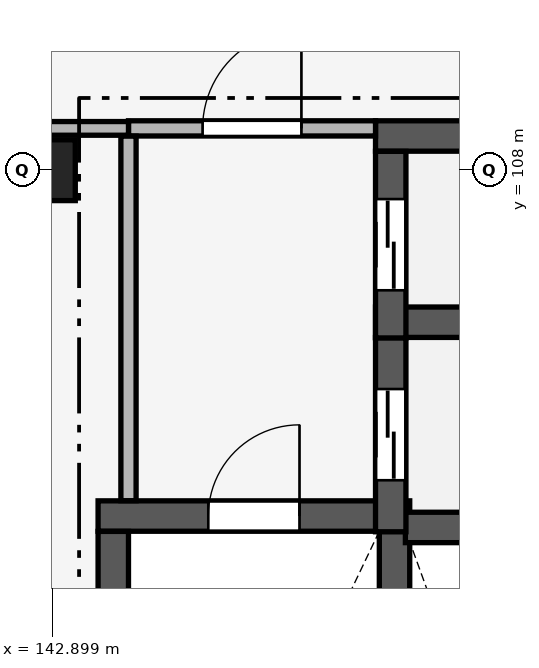
"""IFC4 building model, lengths in metres.
Left out: names, types, materials, properties, quantities, classifications, styles, units other than length and angle.
Written with IfcOpenShell. Run it as: python <this file> out.ifc"""

import sys

from ifc_helpers import new_model, si_unit, direction, frame, frame_2d, origin, origin_2d, place, context, subcontext, project, spatial, rectangle, extrude, element, fill, save


model = new_model("IFC4")
c1 = context("Model", 3, precision=1e-05, world=origin(), true_north=direction((0.0, 1.0)))
c2 = subcontext(c1, "Body", "Model", "MODEL_VIEW")
j1 = project(units=[si_unit("LENGTHUNIT", "METRE"), si_unit("PLANEANGLEUNIT", "RADIAN")], contexts=[c1])
p1 = place(None, origin())
s1 = spatial("IfcSite", under=j1, at=p1, CompositionType="ELEMENT")
p2 = place(p1, origin())
s2 = spatial("IfcBuilding", under=s1, at=p2, CompositionType="ELEMENT")
p3 = place(p2, frame((0.0, 0.0, 15.3)))
s3 = spatial("IfcBuildingStorey", under=s2, at=p3, CompositionType="ELEMENT", Elevation=15.3)
p4 = place(p3, frame((142.8, 108.0, 0.0), z_axis=(0.0, 0.0, 1.0), x_axis=(1.0, 0.0, 0.0)))
e1 = element("IfcColumn", 1, at=p4, inside=s3, PredefinedType="COLUMN", context=c2, shape_type="SweptSolid", body=[
    extrude(rectangle(XDim=0.8, YDim=0.8, at=origin_2d()), origin(), (0.0, 0.0, 1.0), 5.1),
])
p5 = place(p3, frame((143.5, 103.45, 0.0), z_axis=(0.0, 0.0, 1.0), x_axis=(1.0, 0.0, 0.0)))
e2 = element("IfcWall", 2, at=p5, inside=s3, PredefinedType="SHEAR", context=c2, shape_type="SweptSolid", body=[
    extrude(rectangle(XDim=4.1, YDim=0.4, at=frame_2d((2.05, 0.0))), origin(), (0.0, 0.0, 1.0), 4.84),
])
p6 = place(p5, frame((1.45, 0.0, 0.0)))
e3 = element("IfcOpeningElement", 3, at=p6, cuts=e2, PredefinedType="OPENING", context=c2, shape_type="SweptSolid", body=[
    extrude(rectangle(XDim=1.2, YDim=2.2, at=frame_2d((0.6, 1.1))), frame((0.0, 0.215, 0.0), z_axis=(0.0, -1.0, 0.0), x_axis=(1.0, 0.0, 0.0)), (0.0, 0.0, 1.0), 0.43),
])
for number, where, z_axis, x_axis in (
    (4, (143.7, 96.352, 0.0), (0.0, 0.0, 1.0), (0.0, 1.0, 0.0)),
    (5, (147.4, 96.352, 0.0), (0.0, 0.0, 1.0), (0.0, 1.0, 0.0)),
):
    element("IfcWall", number, at=place(p3, frame(where, z_axis=z_axis, x_axis=x_axis)), inside=s3, PredefinedType="SHEAR", context=c2, shape_type="SweptSolid", body=[
        extrude(rectangle(XDim=6.896, YDim=0.4, at=frame_2d((3.448, 0.0))), origin(), (0.0, 0.0, 1.0), 4.84),
    ])
p7 = place(p3, frame((147.543, 103.3, 0.0), z_axis=(0.0, 0.0, 1.0), x_axis=(1.0, 0.0, 0.0)))
e6 = element("IfcWall", 6, at=p7, inside=s3, PredefinedType="SHEAR", context=c2, shape_type="SweptSolid", body=[
    extrude(rectangle(XDim=2.907, YDim=0.4, at=frame_2d((1.454, 0.0))), origin(), (0.0, 0.0, 1.0), 4.84),
])
p8 = place(p3, frame((147.15, 106.0, 0.0), z_axis=(0.0, 0.0, 1.0), x_axis=(1.0, 0.0, 0.0)))
e7 = element("IfcWall", 7, at=p8, inside=s3, PredefinedType="SHEAR", context=c2, shape_type="SweptSolid", body=[
    extrude(rectangle(XDim=3.3, YDim=0.4, at=frame_2d((1.65, 0.0))), origin(), (0.0, 0.0, 1.0), 4.84),
])
p9 = place(p3, frame((147.35, 103.243, 0.0), z_axis=(0.0, 0.0, 1.0), x_axis=(0.0, 1.0, 0.0)))
e8 = element("IfcWall", 8, at=p9, inside=s3, PredefinedType="SHEAR", context=c2, shape_type="SweptSolid", body=[
    extrude(rectangle(XDim=2.555, YDim=0.4, at=frame_2d((1.278, 0.0))), origin(), (0.0, 0.0, 1.0), 4.84),
])
p10 = place(p9, frame((0.678, 0.0, 0.0)))
e9 = element("IfcOpeningElement", 9, at=p10, cuts=e8, PredefinedType="OPENING", context=c2, shape_type="SweptSolid", body=[
    extrude(rectangle(XDim=1.2, YDim=2.15, at=frame_2d((0.6, 1.075))), frame((0.0, 0.215, 0.0), z_axis=(0.0, -1.0, 0.0), x_axis=(1.0, 0.0, 0.0)), (0.0, 0.0, 1.0), 0.43),
])
p11 = place(p3, frame((147.15, 108.45, 0.0), z_axis=(0.0, 0.0, 1.0), x_axis=(1.0, 0.0, 0.0)))
e10 = element("IfcWall", 10, at=p11, inside=s3, PredefinedType="SHEAR", context=c2, shape_type="SweptSolid", body=[
    extrude(rectangle(XDim=3.659, YDim=0.4, at=frame_2d((1.83, 0.0))), origin(), (0.0, 0.0, 1.0), 4.84),
])
p12 = place(p3, frame((147.35, 105.793, 0.0), z_axis=(0.0, 0.0, 1.0), x_axis=(0.0, 1.0, 0.0)))
e11 = element("IfcWall", 11, at=p12, inside=s3, PredefinedType="SHEAR", context=c2, shape_type="SweptSolid", body=[
    extrude(rectangle(XDim=2.455, YDim=0.4, at=frame_2d((1.228, 0.0))), origin(), (0.0, 0.0, 1.0), 4.84),
])
p13 = place(p12, frame((0.627, 0.0, 0.0)))
e12 = element("IfcOpeningElement", 12, at=p13, cuts=e11, PredefinedType="OPENING", context=c2, shape_type="SweptSolid", body=[
    extrude(rectangle(XDim=1.2, YDim=2.15, at=frame_2d((0.6, 1.075))), frame((0.0, 0.215, 0.0), z_axis=(0.0, -1.0, 0.0), x_axis=(1.0, 0.0, 0.0)), (0.0, 0.0, 1.0), 0.43),
])
p14 = place(p3, frame((143.9, 108.55, 0.0), z_axis=(0.0, 0.0, 1.0), x_axis=(1.0, 0.0, 0.0)))
e13 = element("IfcWall", 13, at=p14, inside=s3, PredefinedType="PARTITIONING", context=c2, shape_type="SweptSolid", body=[
    extrude(rectangle(XDim=3.25, YDim=0.2, at=frame_2d((1.625, 0.0))), origin(), (0.0, 0.0, 1.0), 4.84),
])
p15 = place(p14, frame((0.975, 0.0, 0.0)))
e14 = element("IfcOpeningElement", 14, at=p15, cuts=e13, PredefinedType="OPENING", context=c2, shape_type="SweptSolid", body=[
    extrude(rectangle(XDim=1.3, YDim=2.2, at=frame_2d((0.65, 1.1))), frame((0.0, 0.115, 0.0), z_axis=(0.0, -1.0, 0.0), x_axis=(1.0, 0.0, 0.0)), (0.0, 0.0, 1.0), 0.23),
])
p16 = place(p3, frame((142.405, 108.55, 0.0), z_axis=(0.0, 0.0, 1.0), x_axis=(1.0, 0.0, 0.0)))
e15 = element("IfcWall", 15, at=p16, inside=s3, PredefinedType="PARTITIONING", context=c2, shape_type="SweptSolid", body=[
    extrude(rectangle(XDim=1.495, YDim=0.18, at=frame_2d((0.748, 0.0))), origin(), (0.0, 0.0, 1.0), 4.29),
])
p17 = place(p3, frame((143.9, 103.652, 0.0), z_axis=(0.0, 0.0, 1.0), x_axis=(0.0, 1.0, 0.0)))
e16 = element("IfcWall", 16, at=p17, inside=s3, PredefinedType="PARTITIONING", context=c2, shape_type="SweptSolid", body=[
    extrude(rectangle(XDim=4.796, YDim=0.2, at=frame_2d((2.398, 0.0))), origin(), (0.0, 0.0, 1.0), 4.84),
])
p18 = place(p6, origin())
e17 = element("IfcDoor", 17, at=p18, inside=s3, OperationType="SINGLE_SWING_RIGHT", PredefinedType="DOOR", context=c2, shape_type="SweptSolid", body=[
    extrude(rectangle(XDim=1.2, YDim=2.2, at=frame_2d((0.6, 1.1))), frame((0.0, 0.025, 0.0), z_axis=(0.0, -1.0, 0.0), x_axis=(1.0, 0.0, 0.0)), (0.0, 0.0, 1.0), 0.05),
])
fill(e3, e17)
p19 = place(p10, origin())
e18 = element("IfcDoor", 18, at=p19, inside=s3, OperationType="DOUBLE_DOOR_SLIDING", PredefinedType="DOOR", context=c2, shape_type="SweptSolid", body=[
    extrude(rectangle(XDim=1.2, YDim=2.15, at=frame_2d((0.6, 1.075))), frame((0.0, 0.025, 0.0), z_axis=(0.0, -1.0, 0.0), x_axis=(1.0, 0.0, 0.0)), (0.0, 0.0, 1.0), 0.05),
])
fill(e9, e18)
p20 = place(p13, origin())
e19 = element("IfcDoor", 19, at=p20, inside=s3, OperationType="DOUBLE_DOOR_SLIDING", PredefinedType="DOOR", context=c2, shape_type="SweptSolid", body=[
    extrude(rectangle(XDim=1.2, YDim=2.15, at=frame_2d((0.6, 1.075))), frame((0.0, 0.025, 0.0), z_axis=(0.0, -1.0, 0.0), x_axis=(1.0, 0.0, 0.0)), (0.0, 0.0, 1.0), 0.05),
])
fill(e12, e19)
p21 = place(p15, origin())
e20 = element("IfcDoor", 20, at=p21, inside=s3, OperationType="SINGLE_SWING_RIGHT", PredefinedType="DOOR", context=c2, shape_type="SweptSolid", body=[
    extrude(rectangle(XDim=1.3, YDim=2.2, at=frame_2d((0.65, 1.1))), frame((0.0, 0.025, 0.0), z_axis=(0.0, -1.0, 0.0), x_axis=(1.0, 0.0, 0.0)), (0.0, 0.0, 1.0), 0.05),
])
fill(e14, e20)
save(model, sys.argv[1])
